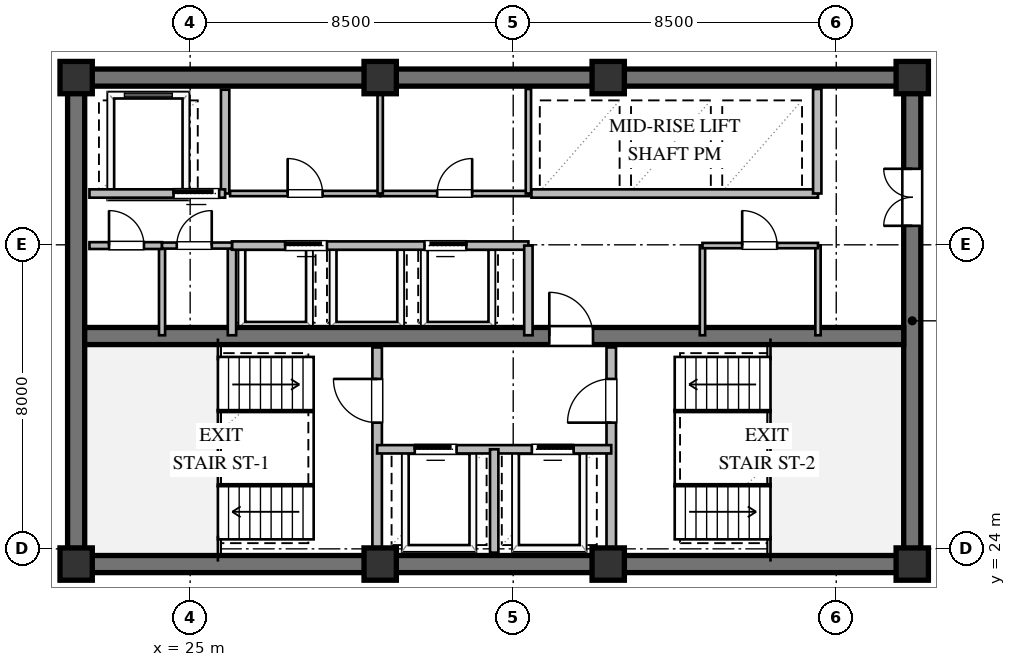
"""IFC4 building model, lengths in metres.
Left out: names, types, materials, properties, quantities, classifications, styles, units other than length and angle.
Written with IfcOpenShell. Run it as: python <this file> out.ifc"""

import sys

from ifc_helpers import new_model, si_unit, direction, frame, frame_2d, origin, origin_2d, place, context, subcontext, project, spatial, rectangle, extrude, element, fill, save


model = new_model("IFC4")
c1 = context("Model", 3, precision=1e-05, world=origin(), true_north=direction((0.0, 1.0)))
c2 = subcontext(c1, "Body", "Model", "MODEL_VIEW")
j1 = project(units=[si_unit("LENGTHUNIT", "METRE"), si_unit("PLANEANGLEUNIT", "RADIAN")], contexts=[c1])
p1 = place(None, origin())
s1 = spatial("IfcSite", under=j1, at=p1, CompositionType="ELEMENT")
p2 = place(p1, origin())
s2 = spatial("IfcBuilding", under=s1, at=p2, CompositionType="ELEMENT")
p3 = place(p2, frame((0.0, 0.0, 195.6)))
s3 = spatial("IfcBuildingStorey", under=s2, at=p3, CompositionType="ELEMENT", Elevation=195.6)
for number, where, z_axis, x_axis in (
    (1, (21.775, 23.6, 0.0), (0.0, 0.0, 1.0), (1.0, 0.0, 0.0)),
    (2, (21.775, 36.4, 0.0), (0.0, 0.0, 1.0), (1.0, 0.0, 0.0)),
):
    element("IfcWall", number, at=place(p3, frame(where, z_axis=z_axis, x_axis=x_axis)), inside=s3, PredefinedType="SHEAR", context=c2, shape_type="SweptSolid", body=[
        extrude(rectangle(XDim=22.45, YDim=0.45, at=frame_2d((11.225, 0.0))), origin(), (0.0, 0.0, 1.0), 3.36),
    ])
p4 = place(p3, frame((22.0, 23.825, 0.0), z_axis=(0.0, 0.0, 1.0), x_axis=(0.0, 1.0, 0.0)))
e3 = element("IfcWall", 3, at=p4, inside=s3, PredefinedType="SHEAR", context=c2, shape_type="SweptSolid", body=[
    extrude(rectangle(XDim=12.35, YDim=0.45, at=frame_2d((6.175, 0.0))), origin(), (0.0, 0.0, 1.0), 3.36),
])
p5 = place(p3, frame((44.0, 23.825, 0.0), z_axis=(0.0, 0.0, 1.0), x_axis=(0.0, 1.0, 0.0)))
e4 = element("IfcWall", 4, at=p5, inside=s3, PredefinedType="SHEAR", context=c2, shape_type="SweptSolid", body=[
    extrude(rectangle(XDim=12.35, YDim=0.45, at=frame_2d((6.175, 0.0))), origin(), (0.0, 0.0, 1.0), 3.36),
])
p6 = place(p5, frame((8.675, 0.0, 0.0)))
e5 = element("IfcOpeningElement", 5, at=p6, cuts=e4, PredefinedType="OPENING", context=c2, shape_type="SweptSolid", body=[
    extrude(rectangle(XDim=1.5, YDim=2.15, at=frame_2d((0.75, 1.075))), frame((0.0, 0.235, 0.0), z_axis=(0.0, -1.0, 0.0), x_axis=(1.0, 0.0, 0.0)), (0.0, 0.0, 1.0), 0.47),
])
p7 = place(p3, frame((22.225, 29.6, 0.0), z_axis=(0.0, 0.0, 1.0), x_axis=(1.0, 0.0, 0.0)))
e6 = element("IfcWall", 6, at=p7, inside=s3, PredefinedType="SHEAR", context=c2, shape_type="SweptSolid", body=[
    extrude(rectangle(XDim=21.55, YDim=0.45, at=frame_2d((10.775, 0.0))), origin(), (0.0, 0.0, 1.0), 3.36),
])
p8 = place(p7, frame((12.225, 0.0, 0.0)))
e7 = element("IfcOpeningElement", 7, at=p8, cuts=e6, PredefinedType="OPENING", context=c2, shape_type="SweptSolid", body=[
    extrude(rectangle(XDim=1.15, YDim=2.1, at=frame_2d((0.575, 1.05))), frame((0.0, 0.235, 0.0), z_axis=(0.0, -1.0, 0.0), x_axis=(1.0, 0.0, 0.0)), (0.0, 0.0, 1.0), 0.47),
])
for number, where, z_axis, x_axis in (
    (8, (22.0, 23.6, 0.0), (0.0, 0.0, 1.0), (1.0, 0.0, 0.0)),
    (9, (30.0, 23.6, 0.0), (0.0, 0.0, 1.0), (1.0, 0.0, 0.0)),
    (10, (36.0, 23.6, 0.0), (0.0, 0.0, 1.0), (1.0, 0.0, 0.0)),
    (11, (44.0, 23.6, 0.0), (0.0, 0.0, 1.0), (1.0, 0.0, 0.0)),
    (12, (44.0, 36.4, 0.0), (0.0, 0.0, 1.0), (1.0, 0.0, 0.0)),
    (13, (36.0, 36.4, 0.0), (0.0, 0.0, 1.0), (1.0, 0.0, 0.0)),
    (14, (30.0, 36.4, 0.0), (0.0, 0.0, 1.0), (1.0, 0.0, 0.0)),
    (15, (22.0, 36.4, 0.0), (0.0, 0.0, 1.0), (1.0, 0.0, 0.0)),
):
    element("IfcColumn", number, at=place(p3, frame(where, z_axis=z_axis, x_axis=x_axis)), inside=s3, PredefinedType="COLUMN", context=c2, shape_type="SweptSolid", body=[
        extrude(rectangle(XDim=0.85, YDim=0.85, at=origin_2d()), origin(), (0.0, 0.0, 1.0), 3.6),
    ])
p9 = place(p3, frame((29.92, 23.9, 0.0), z_axis=(0.0, 0.0, 1.0), x_axis=(0.0, 1.0, 0.0)))
e16 = element("IfcWall", 16, at=p9, inside=s3, PredefinedType="SOLIDWALL", context=c2, shape_type="SweptSolid", body=[
    extrude(rectangle(XDim=5.4, YDim=0.25, at=frame_2d((2.7, 0.0))), origin(), (0.0, 0.0, 1.0), 3.36),
])
p10 = place(p9, frame((3.421, 0.0, 0.0)))
e17 = element("IfcOpeningElement", 17, at=p10, cuts=e16, PredefinedType="OPENING", context=c2, shape_type="SweptSolid", body=[
    extrude(rectangle(XDim=1.15, YDim=2.1, at=frame_2d((0.575, 1.05))), frame((0.0, 0.135, 0.0), z_axis=(0.0, -1.0, 0.0), x_axis=(1.0, 0.0, 0.0)), (0.0, 0.0, 1.0), 0.27),
])
p11 = place(p3, frame((36.08, 23.9, 0.0), z_axis=(0.0, 0.0, 1.0), x_axis=(0.0, 1.0, 0.0)))
e18 = element("IfcWall", 18, at=p11, inside=s3, PredefinedType="SOLIDWALL", context=c2, shape_type="SweptSolid", body=[
    extrude(rectangle(XDim=5.4, YDim=0.25, at=frame_2d((2.7, 0.0))), origin(), (0.0, 0.0, 1.0), 3.36),
])
p12 = place(p11, frame((3.421, 0.0, 0.0)))
e19 = element("IfcOpeningElement", 19, at=p12, cuts=e18, PredefinedType="OPENING", context=c2, shape_type="SweptSolid", body=[
    extrude(rectangle(XDim=1.15, YDim=2.1, at=frame_2d((0.575, 1.05))), frame((0.0, 0.135, 0.0), z_axis=(0.0, -1.0, 0.0), x_axis=(1.0, 0.0, 0.0)), (0.0, 0.0, 1.0), 0.27),
])
p13 = place(p3, frame((29.92, 26.62, 0.0), z_axis=(0.0, 0.0, 1.0), x_axis=(1.0, 0.0, 0.0)))
e20 = element("IfcWall", 20, at=p13, inside=s3, PredefinedType="SOLIDWALL", context=c2, shape_type="SweptSolid", body=[
    extrude(rectangle(XDim=6.16, YDim=0.22, at=frame_2d((3.08, 0.0))), origin(), (0.0, 0.0, 1.0), 3.36),
])
p14 = place(p13, frame((0.99, 0.0, 0.0)))
e21 = element("IfcOpeningElement", 21, at=p14, cuts=e20, PredefinedType="OPENING", context=c2, shape_type="SweptSolid", body=[
    extrude(rectangle(XDim=1.1, YDim=2.1, at=frame_2d((0.55, 1.05))), frame((0.0, 0.12, 0.0), z_axis=(0.0, -1.0, 0.0), x_axis=(1.0, 0.0, 0.0)), (0.0, 0.0, 1.0), 0.24),
])
p15 = place(p13, frame((4.07, 0.0, 0.0)))
e22 = element("IfcOpeningElement", 22, at=p15, cuts=e20, PredefinedType="OPENING", context=c2, shape_type="SweptSolid", body=[
    extrude(rectangle(XDim=1.1, YDim=2.1, at=frame_2d((0.55, 1.05))), frame((0.0, 0.12, 0.0), z_axis=(0.0, -1.0, 0.0), x_axis=(1.0, 0.0, 0.0)), (0.0, 0.0, 1.0), 0.24),
])
p16 = place(p3, frame((33.0, 23.9, 0.0), z_axis=(0.0, 0.0, 1.0), x_axis=(0.0, 1.0, 0.0)))
e23 = element("IfcWall", 23, at=p16, inside=s3, PredefinedType="SOLIDWALL", context=c2, shape_type="SweptSolid", body=[
    extrude(rectangle(XDim=2.72, YDim=0.22, at=frame_2d((1.36, 0.0))), origin(), (0.0, 0.0, 1.0), 3.36),
])
p17 = place(p3, frame((25.92, 33.35, 0.0), z_axis=(0.0, 0.0, 1.0), x_axis=(0.0, 1.0, 0.0)))
e24 = element("IfcWall", 24, at=p17, inside=s3, PredefinedType="SOLIDWALL", context=c2, shape_type="SweptSolid", body=[
    extrude(rectangle(XDim=2.73, YDim=0.22, at=frame_2d((1.365, 0.0))), origin(), (0.0, 0.0, 1.0), 3.36),
])
p18 = place(p3, frame((22.35, 33.35, 0.0), z_axis=(0.0, 0.0, 1.0), x_axis=(1.0, 0.0, 0.0)))
e25 = element("IfcWall", 25, at=p18, inside=s3, PredefinedType="SOLIDWALL", context=c2, shape_type="SweptSolid", body=[
    extrude(rectangle(XDim=3.57, YDim=0.22, at=frame_2d((1.785, 0.0))), origin(), (0.0, 0.0, 1.0), 3.36),
])
p19 = place(p18, frame((2.213, 0.0, 0.0)))
e26 = element("IfcOpeningElement", 26, at=p19, cuts=e25, PredefinedType="OPENING", context=c2, shape_type="SweptSolid", body=[
    extrude(rectangle(XDim=1.2, YDim=2.1, at=frame_2d((0.6, 1.05))), frame((0.0, 0.12, 0.0), z_axis=(0.0, -1.0, 0.0), x_axis=(1.0, 0.0, 0.0)), (0.0, 0.0, 1.0), 0.24),
])
p20 = place(p3, frame((26.1, 29.62, 0.0), z_axis=(0.0, 0.0, 1.0), x_axis=(0.0, 1.0, 0.0)))
e27 = element("IfcWall", 27, at=p20, inside=s3, PredefinedType="SOLIDWALL", context=c2, shape_type="SweptSolid", body=[
    extrude(rectangle(XDim=2.36, YDim=0.22, at=frame_2d((1.18, 0.0))), origin(), (0.0, 0.0, 1.0), 3.36),
])
p21 = place(p3, frame((26.1, 31.98, 0.0), z_axis=(0.0, 0.0, 1.0), x_axis=(1.0, 0.0, 0.0)))
e28 = element("IfcWall", 28, at=p21, inside=s3, PredefinedType="SOLIDWALL", context=c2, shape_type="SweptSolid", body=[
    extrude(rectangle(XDim=7.8, YDim=0.22, at=frame_2d((3.9, 0.0))), origin(), (0.0, 0.0, 1.0), 3.36),
])
p22 = place(p21, frame((1.4, 0.0, 0.0)))
e29 = element("IfcOpeningElement", 29, at=p22, cuts=e28, PredefinedType="OPENING", context=c2, shape_type="SweptSolid", body=[
    extrude(rectangle(XDim=1.1, YDim=2.1, at=frame_2d((0.55, 1.05))), frame((0.0, 0.12, 0.0), z_axis=(0.0, -1.0, 0.0), x_axis=(1.0, 0.0, 0.0)), (0.0, 0.0, 1.0), 0.24),
])
p23 = place(p21, frame((5.066, 0.0, 0.0)))
e30 = element("IfcOpeningElement", 30, at=p23, cuts=e28, PredefinedType="OPENING", context=c2, shape_type="SweptSolid", body=[
    extrude(rectangle(XDim=1.1, YDim=2.1, at=frame_2d((0.55, 1.05))), frame((0.0, 0.12, 0.0), z_axis=(0.0, -1.0, 0.0), x_axis=(1.0, 0.0, 0.0)), (0.0, 0.0, 1.0), 0.24),
])
p24 = place(p3, frame((33.9, 29.62, 0.0), z_axis=(0.0, 0.0, 1.0), x_axis=(0.0, 1.0, 0.0)))
e31 = element("IfcWall", 31, at=p24, inside=s3, PredefinedType="SOLIDWALL", context=c2, shape_type="SweptSolid", body=[
    extrude(rectangle(XDim=2.36, YDim=0.22, at=frame_2d((1.18, 0.0))), origin(), (0.0, 0.0, 1.0), 3.36),
])
p25 = place(p3, frame((26.05, 33.35, 0.0), z_axis=(0.0, 0.0, 1.0), x_axis=(1.0, 0.0, 0.0)))
e32 = element("IfcWall", 32, at=p25, inside=s3, PredefinedType="PARTITIONING", context=c2, shape_type="SweptSolid", body=[
    extrude(rectangle(XDim=3.95, YDim=0.14, at=frame_2d((1.975, 0.0))), origin(), (0.0, 0.0, 1.0), 3.36),
])
p26 = place(p25, frame((1.515, 0.0, 0.0)))
e33 = element("IfcOpeningElement", 33, at=p26, cuts=e32, PredefinedType="OPENING", context=c2, shape_type="SweptSolid", body=[
    extrude(rectangle(XDim=0.92, YDim=2.1, at=frame_2d((0.46, 1.05))), frame((0.0, 0.08, 0.0), z_axis=(0.0, -1.0, 0.0), x_axis=(1.0, 0.0, 0.0)), (0.0, 0.0, 1.0), 0.16),
])
p27 = place(p3, frame((30.0, 33.35, 0.0), z_axis=(0.0, 0.0, 1.0), x_axis=(1.0, 0.0, 0.0)))
e34 = element("IfcWall", 34, at=p27, inside=s3, PredefinedType="PARTITIONING", context=c2, shape_type="SweptSolid", body=[
    extrude(rectangle(XDim=3.92, YDim=0.14, at=frame_2d((1.96, 0.0))), origin(), (0.0, 0.0, 1.0), 3.36),
])
p28 = place(p27, frame((1.5, 0.0, 0.0)))
e35 = element("IfcOpeningElement", 35, at=p28, cuts=e34, PredefinedType="OPENING", context=c2, shape_type="SweptSolid", body=[
    extrude(rectangle(XDim=0.92, YDim=2.1, at=frame_2d((0.46, 1.05))), frame((0.0, 0.08, 0.0), z_axis=(0.0, -1.0, 0.0), x_axis=(1.0, 0.0, 0.0)), (0.0, 0.0, 1.0), 0.16),
])
for number, where, z_axis, x_axis in (
    (36, (30.0, 33.35, 0.0), (0.0, 0.0, 1.0), (0.0, 1.0, 0.0)),
    (37, (33.9, 33.35, 0.0), (0.0, 0.0, 1.0), (0.0, 1.0, 0.0)),
):
    element("IfcWall", number, at=place(p3, frame(where, z_axis=z_axis, x_axis=x_axis)), inside=s3, PredefinedType="PARTITIONING", context=c2, shape_type="SweptSolid", body=[
        extrude(rectangle(XDim=2.75, YDim=0.14, at=frame_2d((1.375, 0.0))), origin(), (0.0, 0.0, 1.0), 3.36),
    ])
p29 = place(p3, frame((33.98, 33.35, 0.0), z_axis=(0.0, 0.0, 1.0), x_axis=(1.0, 0.0, 0.0)))
e38 = element("IfcWall", 38, at=p29, inside=s3, PredefinedType="SOLIDWALL", context=c2, shape_type="SweptSolid", body=[
    extrude(rectangle(XDim=7.54, YDim=0.22, at=frame_2d((3.77, 0.0))), origin(), (0.0, 0.0, 1.0), 3.36),
])
p30 = place(p3, frame((41.5, 33.35, 0.0), z_axis=(0.0, 0.0, 1.0), x_axis=(0.0, 1.0, 0.0)))
e39 = element("IfcWall", 39, at=p30, inside=s3, PredefinedType="SOLIDWALL", context=c2, shape_type="SweptSolid", body=[
    extrude(rectangle(XDim=2.75, YDim=0.22, at=frame_2d((1.375, 0.0))), origin(), (0.0, 0.0, 1.0), 3.36),
])
p31 = place(p3, frame((24.26, 29.62, 0.0), z_axis=(0.0, 0.0, 1.0), x_axis=(0.0, 1.0, 0.0)))
e40 = element("IfcWall", 40, at=p31, inside=s3, PredefinedType="PLUMBINGWALL", context=c2, shape_type="SweptSolid", body=[
    extrude(rectangle(XDim=2.36, YDim=0.16, at=frame_2d((1.18, 0.0))), origin(), (0.0, 0.0, 1.0), 3.36),
])
p32 = place(p3, frame((22.35, 31.98, 0.0), z_axis=(0.0, 0.0, 1.0), x_axis=(1.0, 0.0, 0.0)))
e41 = element("IfcWall", 41, at=p32, inside=s3, PredefinedType="PARTITIONING", context=c2, shape_type="SweptSolid", body=[
    extrude(rectangle(XDim=1.91, YDim=0.18, at=frame_2d((0.955, 0.0))), origin(), (0.0, 0.0, 1.0), 3.36),
])
p33 = place(p32, frame((0.515, 0.0, 0.0)))
e42 = element("IfcOpeningElement", 42, at=p33, cuts=e41, PredefinedType="OPENING", context=c2, shape_type="SweptSolid", body=[
    extrude(rectangle(XDim=0.92, YDim=2.1, at=frame_2d((0.46, 1.05))), frame((0.0, 0.1, 0.0), z_axis=(0.0, -1.0, 0.0), x_axis=(1.0, 0.0, 0.0)), (0.0, 0.0, 1.0), 0.2),
])
p34 = place(p3, frame((24.26, 31.98, 0.0), z_axis=(0.0, 0.0, 1.0), x_axis=(1.0, 0.0, 0.0)))
e43 = element("IfcWall", 43, at=p34, inside=s3, PredefinedType="PLUMBINGWALL", context=c2, shape_type="SweptSolid", body=[
    extrude(rectangle(XDim=1.84, YDim=0.16, at=frame_2d((0.92, 0.0))), origin(), (0.0, 0.0, 1.0), 3.36),
])
p35 = place(p34, frame((0.388, 0.0, 0.0)))
e44 = element("IfcOpeningElement", 44, at=p35, cuts=e43, PredefinedType="OPENING", context=c2, shape_type="SweptSolid", body=[
    extrude(rectangle(XDim=0.92, YDim=2.1, at=frame_2d((0.46, 1.05))), frame((0.0, 0.09, 0.0), z_axis=(0.0, -1.0, 0.0), x_axis=(1.0, 0.0, 0.0)), (0.0, 0.0, 1.0), 0.18),
])
for number, where, z_axis, x_axis in (
    (45, (38.48, 29.62, 0.0), (0.0, 0.0, 1.0), (0.0, 1.0, 0.0)),
    (46, (41.52, 29.62, 0.0), (0.0, 0.0, 1.0), (0.0, 1.0, 0.0)),
):
    element("IfcWall", number, at=place(p3, frame(where, z_axis=z_axis, x_axis=x_axis)), inside=s3, PredefinedType="PARTITIONING", context=c2, shape_type="SweptSolid", body=[
        extrude(rectangle(XDim=2.36, YDim=0.14, at=frame_2d((1.18, 0.0))), origin(), (0.0, 0.0, 1.0), 3.36),
    ])
p36 = place(p3, frame((38.48, 31.98, 0.0), z_axis=(0.0, 0.0, 1.0), x_axis=(1.0, 0.0, 0.0)))
e47 = element("IfcWall", 47, at=p36, inside=s3, PredefinedType="PARTITIONING", context=c2, shape_type="SweptSolid", body=[
    extrude(rectangle(XDim=3.04, YDim=0.14, at=frame_2d((1.52, 0.0))), origin(), (0.0, 0.0, 1.0), 3.36),
])
p37 = place(p36, frame((1.045, 0.0, 0.0)))
e48 = element("IfcOpeningElement", 48, at=p37, cuts=e47, PredefinedType="OPENING", context=c2, shape_type="SweptSolid", body=[
    extrude(rectangle(XDim=0.92, YDim=2.1, at=frame_2d((0.46, 1.05))), frame((0.0, 0.08, 0.0), z_axis=(0.0, -1.0, 0.0), x_axis=(1.0, 0.0, 0.0)), (0.0, 0.0, 1.0), 0.16),
])
p38 = place(p10, origin())
e49 = element("IfcDoor", 49, at=p38, inside=s3, OperationType="SINGLE_SWING_RIGHT", PredefinedType="DOOR", context=c2, shape_type="SweptSolid", body=[
    extrude(rectangle(XDim=1.15, YDim=2.1, at=frame_2d((0.575, 1.05))), frame((0.0, 0.025, 0.0), z_axis=(0.0, -1.0, 0.0), x_axis=(1.0, 0.0, 0.0)), (0.0, 0.0, 1.0), 0.05),
])
fill(e17, e49)
p39 = place(p12, origin())
e50 = element("IfcDoor", 50, at=p39, inside=s3, OperationType="SINGLE_SWING_LEFT", PredefinedType="DOOR", context=c2, shape_type="SweptSolid", body=[
    extrude(rectangle(XDim=1.15, YDim=2.1, at=frame_2d((0.575, 1.05))), frame((0.0, 0.025, 0.0), z_axis=(0.0, -1.0, 0.0), x_axis=(1.0, 0.0, 0.0)), (0.0, 0.0, 1.0), 0.05),
])
fill(e19, e50)
p40 = place(p14, origin())
e51 = element("IfcDoor", 51, at=p40, inside=s3, OperationType="SLIDING_TO_LEFT", PredefinedType="DOOR", context=c2, shape_type="SweptSolid", body=[
    extrude(rectangle(XDim=1.1, YDim=2.1, at=frame_2d((0.55, 1.05))), frame((0.0, 0.025, 0.0), z_axis=(0.0, -1.0, 0.0), x_axis=(1.0, 0.0, 0.0)), (0.0, 0.0, 1.0), 0.05),
])
fill(e21, e51)
p41 = place(p15, origin())
e52 = element("IfcDoor", 52, at=p41, inside=s3, OperationType="SLIDING_TO_RIGHT", PredefinedType="DOOR", context=c2, shape_type="SweptSolid", body=[
    extrude(rectangle(XDim=1.1, YDim=2.1, at=frame_2d((0.55, 1.05))), frame((0.0, 0.025, 0.0), z_axis=(0.0, -1.0, 0.0), x_axis=(1.0, 0.0, 0.0)), (0.0, 0.0, 1.0), 0.05),
])
fill(e22, e52)
p42 = place(p8, origin())
e53 = element("IfcDoor", 53, at=p42, inside=s3, OperationType="SINGLE_SWING_LEFT", PredefinedType="DOOR", context=c2, shape_type="SweptSolid", body=[
    extrude(rectangle(XDim=1.15, YDim=2.1, at=frame_2d((0.575, 1.05))), frame((0.0, 0.025, 0.0), z_axis=(0.0, -1.0, 0.0), x_axis=(1.0, 0.0, 0.0)), (0.0, 0.0, 1.0), 0.05),
])
fill(e7, e53)
p43 = place(p6, origin())
e54 = element("IfcDoor", 54, at=p43, inside=s3, OperationType="DOUBLE_DOOR_SINGLE_SWING", PredefinedType="DOOR", context=c2, shape_type="SweptSolid", body=[
    extrude(rectangle(XDim=1.5, YDim=2.15, at=frame_2d((0.75, 1.075))), frame((0.0, 0.025, 0.0), z_axis=(0.0, -1.0, 0.0), x_axis=(1.0, 0.0, 0.0)), (0.0, 0.0, 1.0), 0.05),
])
fill(e5, e54)
p44 = place(p19, origin())
e55 = element("IfcDoor", 55, at=p44, inside=s3, OperationType="SLIDING_TO_LEFT", PredefinedType="DOOR", context=c2, shape_type="SweptSolid", body=[
    extrude(rectangle(XDim=1.2, YDim=2.1, at=frame_2d((0.6, 1.05))), frame((0.0, 0.025, 0.0), z_axis=(0.0, -1.0, 0.0), x_axis=(1.0, 0.0, 0.0)), (0.0, 0.0, 1.0), 0.05),
])
fill(e26, e55)
p45 = place(p22, origin())
e56 = element("IfcDoor", 56, at=p45, inside=s3, OperationType="SLIDING_TO_LEFT", PredefinedType="DOOR", context=c2, shape_type="SweptSolid", body=[
    extrude(rectangle(XDim=1.1, YDim=2.1, at=frame_2d((0.55, 1.05))), frame((0.0, 0.025, 0.0), z_axis=(0.0, -1.0, 0.0), x_axis=(1.0, 0.0, 0.0)), (0.0, 0.0, 1.0), 0.05),
])
fill(e29, e56)
p46 = place(p23, origin())
e57 = element("IfcDoor", 57, at=p46, inside=s3, OperationType="SLIDING_TO_RIGHT", PredefinedType="DOOR", context=c2, shape_type="SweptSolid", body=[
    extrude(rectangle(XDim=1.1, YDim=2.1, at=frame_2d((0.55, 1.05))), frame((0.0, 0.025, 0.0), z_axis=(0.0, -1.0, 0.0), x_axis=(1.0, 0.0, 0.0)), (0.0, 0.0, 1.0), 0.05),
])
fill(e30, e57)
p47 = place(p26, origin())
e58 = element("IfcDoor", 58, at=p47, inside=s3, OperationType="SINGLE_SWING_LEFT", PredefinedType="DOOR", context=c2, shape_type="SweptSolid", body=[
    extrude(rectangle(XDim=0.92, YDim=2.1, at=frame_2d((0.46, 1.05))), frame((0.0, 0.025, 0.0), z_axis=(0.0, -1.0, 0.0), x_axis=(1.0, 0.0, 0.0)), (0.0, 0.0, 1.0), 0.05),
])
fill(e33, e58)
p48 = place(p28, origin())
e59 = element("IfcDoor", 59, at=p48, inside=s3, OperationType="SINGLE_SWING_RIGHT", PredefinedType="DOOR", context=c2, shape_type="SweptSolid", body=[
    extrude(rectangle(XDim=0.92, YDim=2.1, at=frame_2d((0.46, 1.05))), frame((0.0, 0.025, 0.0), z_axis=(0.0, -1.0, 0.0), x_axis=(1.0, 0.0, 0.0)), (0.0, 0.0, 1.0), 0.05),
])
fill(e35, e59)
p49 = place(p33, origin())
e60 = element("IfcDoor", 60, at=p49, inside=s3, OperationType="SINGLE_SWING_LEFT", PredefinedType="DOOR", context=c2, shape_type="SweptSolid", body=[
    extrude(rectangle(XDim=0.92, YDim=2.1, at=frame_2d((0.46, 1.05))), frame((0.0, 0.025, 0.0), z_axis=(0.0, -1.0, 0.0), x_axis=(1.0, 0.0, 0.0)), (0.0, 0.0, 1.0), 0.05),
])
fill(e42, e60)
p50 = place(p35, origin())
e61 = element("IfcDoor", 61, at=p50, inside=s3, OperationType="SINGLE_SWING_RIGHT", PredefinedType="DOOR", context=c2, shape_type="SweptSolid", body=[
    extrude(rectangle(XDim=0.92, YDim=2.1, at=frame_2d((0.46, 1.05))), frame((0.0, 0.025, 0.0), z_axis=(0.0, -1.0, 0.0), x_axis=(1.0, 0.0, 0.0)), (0.0, 0.0, 1.0), 0.05),
])
fill(e44, e61)
p51 = place(p37, origin())
e62 = element("IfcDoor", 62, at=p51, inside=s3, OperationType="SINGLE_SWING_LEFT", PredefinedType="DOOR", context=c2, shape_type="SweptSolid", body=[
    extrude(rectangle(XDim=0.92, YDim=2.1, at=frame_2d((0.46, 1.05))), frame((0.0, 0.025, 0.0), z_axis=(0.0, -1.0, 0.0), x_axis=(1.0, 0.0, 0.0)), (0.0, 0.0, 1.0), 0.05),
])
fill(e48, e62)
save(model, sys.argv[1])
